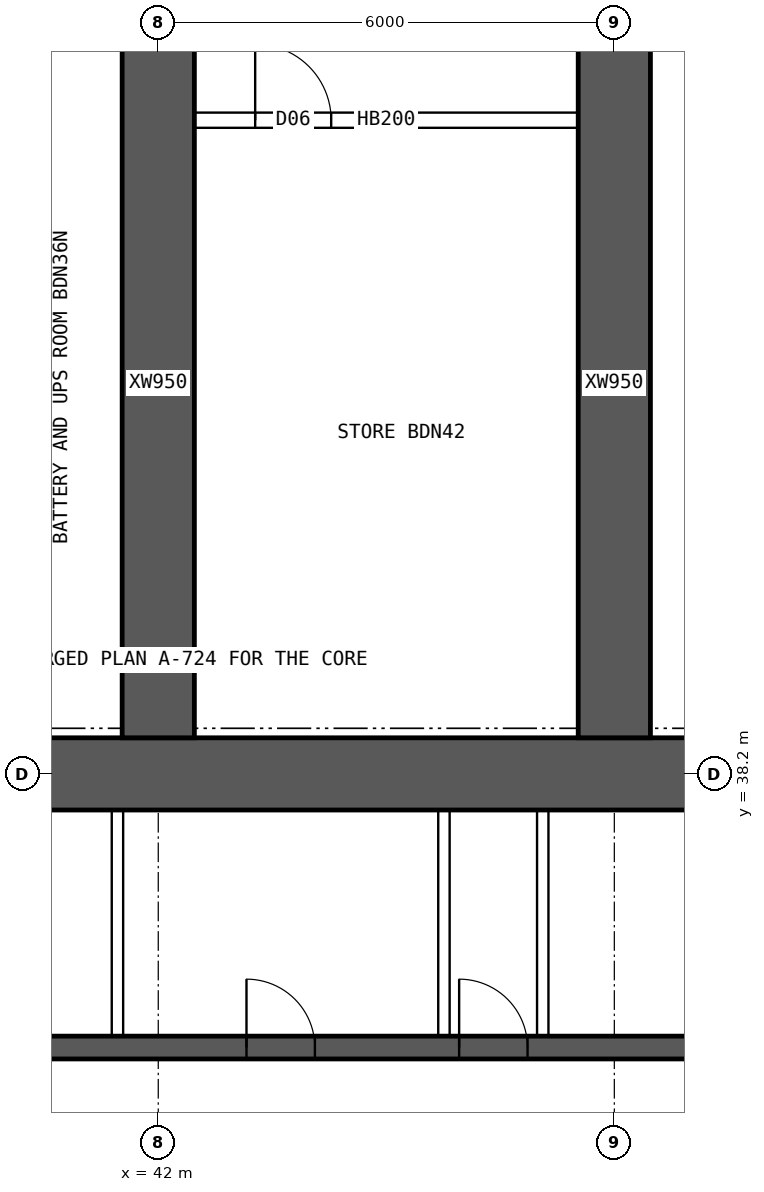
"""IFC4 building model, lengths in metres.
Left out: names, types, materials, properties, quantities, classifications, styles, units other than length and angle.
Written with IfcOpenShell. Run it as: python <this file> out.ifc"""

import sys

from ifc_helpers import new_model, si_unit, direction, frame, frame_2d, origin, place, context, subcontext, project, spatial, rectangle, extrude, element, fill, save


model = new_model("IFC4")
c1 = context("Model", 3, precision=1e-05, world=origin(), true_north=direction((0.0, 1.0)))
c2 = subcontext(c1, "Body", "Model", "MODEL_VIEW")
j1 = project(units=[si_unit("LENGTHUNIT", "METRE"), si_unit("PLANEANGLEUNIT", "RADIAN")], contexts=[c1])
p1 = place(None, origin())
s1 = spatial("IfcSite", under=j1, at=p1, CompositionType="ELEMENT")
p2 = place(p1, origin())
s2 = spatial("IfcBuilding", under=s1, at=p2, CompositionType="ELEMENT")
p3 = place(p2, frame((0.0, 0.0, 88.15)))
s3 = spatial("IfcBuildingStorey", under=s2, at=p3, CompositionType="ELEMENT", Elevation=88.15)
p4 = place(p3, frame((18.0, 38.2, 0.0), z_axis=(0.0, 0.0, 1.0), x_axis=(1.0, 0.0, 0.0)))
e1 = element("IfcWall", 1, at=p4, inside=s3, PredefinedType="SHEAR", context=c2, shape_type="SweptSolid", body=[
    extrude(rectangle(XDim=48.0, YDim=0.95, at=frame_2d((24.0, 0.0))), origin(), (0.0, 0.0, 1.0), 3.75),
])
p5 = place(p3, frame((18.475, 34.6, 0.0), z_axis=(0.0, 0.0, 1.0), x_axis=(1.0, 0.0, 0.0)))
e2 = element("IfcWall", 2, at=p5, inside=s3, PredefinedType="SHEAR", context=c2, shape_type="SweptSolid", body=[
    extrude(rectangle(XDim=47.05, YDim=0.3, at=frame_2d((23.525, 0.0))), origin(), (0.0, 0.0, 1.0), 3.75),
])
p6 = place(p5, frame((0.9, 0.0, 0.0)))
e3 = element("IfcOpeningElement", 3, at=p6, cuts=e2, PredefinedType="OPENING", context=c2, shape_type="SweptSolid", body=[
    extrude(rectangle(XDim=1.1, YDim=2.1, at=frame_2d((0.55, 1.05))), frame((0.0, 0.16, 0.0), z_axis=(0.0, -1.0, 0.0), x_axis=(1.0, 0.0, 0.0)), (0.0, 0.0, 1.0), 0.32),
])
p7 = place(p5, frame((45.05, 0.0, 0.0)))
e4 = element("IfcOpeningElement", 4, at=p7, cuts=e2, PredefinedType="OPENING", context=c2, shape_type="SweptSolid", body=[
    extrude(rectangle(XDim=1.1, YDim=2.1, at=frame_2d((0.55, 1.05))), frame((0.0, 0.16, 0.0), z_axis=(0.0, -1.0, 0.0), x_axis=(1.0, 0.0, 0.0)), (0.0, 0.0, 1.0), 0.32),
])
p8 = place(p5, frame((4.125, 0.0, 0.0)))
e5 = element("IfcOpeningElement", 5, at=p8, cuts=e2, PredefinedType="OPENING", context=c2, shape_type="SweptSolid", body=[
    extrude(rectangle(XDim=0.9, YDim=2.1, at=frame_2d((0.45, 1.05))), frame((0.0, 0.16, 0.0), z_axis=(0.0, -1.0, 0.0), x_axis=(1.0, 0.0, 0.0)), (0.0, 0.0, 1.0), 0.32),
])
p9 = place(p5, frame((42.025, 0.0, 0.0)))
e6 = element("IfcOpeningElement", 6, at=p9, cuts=e2, PredefinedType="OPENING", context=c2, shape_type="SweptSolid", body=[
    extrude(rectangle(XDim=0.9, YDim=2.1, at=frame_2d((0.45, 1.05))), frame((0.0, 0.16, 0.0), z_axis=(0.0, -1.0, 0.0), x_axis=(1.0, 0.0, 0.0)), (0.0, 0.0, 1.0), 0.32),
])
p10 = place(p5, frame((8.9, 0.0, 0.0)))
e7 = element("IfcOpeningElement", 7, at=p10, cuts=e2, PredefinedType="OPENING", context=c2, shape_type="SweptSolid", body=[
    extrude(rectangle(XDim=0.9, YDim=2.1, at=frame_2d((0.45, 1.05))), frame((0.0, 0.16, 0.0), z_axis=(0.0, -1.0, 0.0), x_axis=(1.0, 0.0, 0.0)), (0.0, 0.0, 1.0), 0.32),
])
p11 = place(p5, frame((12.874, 0.0, 0.0)))
e8 = element("IfcOpeningElement", 8, at=p11, cuts=e2, PredefinedType="OPENING", context=c2, shape_type="SweptSolid", body=[
    extrude(rectangle(XDim=0.9, YDim=2.1, at=frame_2d((0.45, 1.05))), frame((0.0, 0.16, 0.0), z_axis=(0.0, -1.0, 0.0), x_axis=(1.0, 0.0, 0.0)), (0.0, 0.0, 1.0), 0.32),
])
p12 = place(p5, frame((16.521, 0.0, 0.0)))
e9 = element("IfcOpeningElement", 9, at=p12, cuts=e2, PredefinedType="OPENING", context=c2, shape_type="SweptSolid", body=[
    extrude(rectangle(XDim=0.9, YDim=2.1, at=frame_2d((0.45, 1.05))), frame((0.0, 0.16, 0.0), z_axis=(0.0, -1.0, 0.0), x_axis=(1.0, 0.0, 0.0)), (0.0, 0.0, 1.0), 0.32),
])
p13 = place(p5, frame((20.28, 0.0, 0.0)))
e10 = element("IfcOpeningElement", 10, at=p13, cuts=e2, PredefinedType="OPENING", context=c2, shape_type="SweptSolid", body=[
    extrude(rectangle(XDim=0.9, YDim=2.1, at=frame_2d((0.45, 1.05))), frame((0.0, 0.16, 0.0), z_axis=(0.0, -1.0, 0.0), x_axis=(1.0, 0.0, 0.0)), (0.0, 0.0, 1.0), 0.32),
])
p14 = place(p5, frame((24.686, 0.0, 0.0)))
e11 = element("IfcOpeningElement", 11, at=p14, cuts=e2, PredefinedType="OPENING", context=c2, shape_type="SweptSolid", body=[
    extrude(rectangle(XDim=0.9, YDim=2.1, at=frame_2d((0.45, 1.05))), frame((0.0, 0.16, 0.0), z_axis=(0.0, -1.0, 0.0), x_axis=(1.0, 0.0, 0.0)), (0.0, 0.0, 1.0), 0.32),
])
p15 = place(p5, frame((27.483, 0.0, 0.0)))
e12 = element("IfcOpeningElement", 12, at=p15, cuts=e2, PredefinedType="OPENING", context=c2, shape_type="SweptSolid", body=[
    extrude(rectangle(XDim=0.9, YDim=2.1, at=frame_2d((0.45, 1.05))), frame((0.0, 0.16, 0.0), z_axis=(0.0, -1.0, 0.0), x_axis=(1.0, 0.0, 0.0)), (0.0, 0.0, 1.0), 0.32),
])
p16 = place(p5, frame((33.604, 0.0, 0.0)))
e13 = element("IfcOpeningElement", 13, at=p16, cuts=e2, PredefinedType="OPENING", context=c2, shape_type="SweptSolid", body=[
    extrude(rectangle(XDim=0.9, YDim=2.1, at=frame_2d((0.45, 1.05))), frame((0.0, 0.16, 0.0), z_axis=(0.0, -1.0, 0.0), x_axis=(1.0, 0.0, 0.0)), (0.0, 0.0, 1.0), 0.32),
])
for number, where, z_axis, x_axis in (
    (14, (42.0, 38.675, 0.0), (0.0, 0.0, 1.0), (0.0, 1.0, 0.0)),
    (15, (48.0, 38.675, 0.0), (0.0, 0.0, 1.0), (0.0, 1.0, 0.0)),
):
    element("IfcWall", number, at=place(p3, frame(where, z_axis=z_axis, x_axis=x_axis)), inside=s3, PredefinedType="SHEAR", context=c2, shape_type="SweptSolid", body=[
        extrude(rectangle(XDim=9.325, YDim=0.95, at=frame_2d((4.663, 0.0))), origin(), (0.0, 0.0, 1.0), 3.75),
    ])
for number, where, z_axis, x_axis in (
    (16, (41.463, 34.75, 0.0), (0.0, 0.0, 1.0), (0.0, 1.0, 0.0)),
    (17, (45.758, 34.75, 0.0), (0.0, 0.0, 1.0), (0.0, 1.0, 0.0)),
    (18, (47.058, 34.75, 0.0), (0.0, 0.0, 1.0), (0.0, 1.0, 0.0)),
):
    element("IfcWall", number, at=place(p3, frame(where, z_axis=z_axis, x_axis=x_axis)), inside=s3, PredefinedType="SOLIDWALL", context=c2, shape_type="SweptSolid", body=[
        extrude(rectangle(XDim=2.975, YDim=0.15, at=frame_2d((1.488, 0.0))), origin(), (0.0, 0.0, 1.0), 3.5),
    ])
p17 = place(p3, frame((42.475, 46.8, 0.0), z_axis=(0.0, 0.0, 1.0), x_axis=(1.0, 0.0, 0.0)))
e19 = element("IfcWall", 19, at=p17, inside=s3, PredefinedType="SOLIDWALL", context=c2, shape_type="SweptSolid", body=[
    extrude(rectangle(XDim=5.05, YDim=0.2, at=frame_2d((2.525, 0.0))), origin(), (0.0, 0.0, 1.0), 3.5),
])
p18 = place(p17, frame((0.8, 0.0, 0.0)))
e20 = element("IfcOpeningElement", 20, at=p18, cuts=e19, PredefinedType="OPENING", context=c2, shape_type="SweptSolid", body=[
    extrude(rectangle(XDim=1.0, YDim=2.1, at=frame_2d((0.5, 1.05))), frame((0.0, 0.11, 0.0), z_axis=(0.0, -1.0, 0.0), x_axis=(1.0, 0.0, 0.0)), (0.0, 0.0, 1.0), 0.22),
])
p19 = place(p14, origin())
e21 = element("IfcDoor", 21, at=p19, inside=s3, OperationType="SINGLE_SWING_LEFT", PredefinedType="DOOR", context=c2, shape_type="SweptSolid", body=[
    extrude(rectangle(XDim=0.9, YDim=2.1, at=frame_2d((0.45, 1.05))), frame((0.0, 0.025, 0.0), z_axis=(0.0, -1.0, 0.0), x_axis=(1.0, 0.0, 0.0)), (0.0, 0.0, 1.0), 0.05),
])
fill(e11, e21)
p20 = place(p15, origin())
e22 = element("IfcDoor", 22, at=p20, inside=s3, OperationType="SINGLE_SWING_LEFT", PredefinedType="DOOR", context=c2, shape_type="SweptSolid", body=[
    extrude(rectangle(XDim=0.9, YDim=2.1, at=frame_2d((0.45, 1.05))), frame((0.0, 0.025, 0.0), z_axis=(0.0, -1.0, 0.0), x_axis=(1.0, 0.0, 0.0)), (0.0, 0.0, 1.0), 0.05),
])
fill(e12, e22)
p21 = place(p18, origin())
e23 = element("IfcDoor", 23, at=p21, inside=s3, OperationType="SINGLE_SWING_LEFT", PredefinedType="DOOR", context=c2, shape_type="SweptSolid", body=[
    extrude(rectangle(XDim=1.0, YDim=2.1, at=frame_2d((0.5, 1.05))), frame((0.0, 0.025, 0.0), z_axis=(0.0, -1.0, 0.0), x_axis=(1.0, 0.0, 0.0)), (0.0, 0.0, 1.0), 0.05),
])
fill(e20, e23)
save(model, sys.argv[1])
